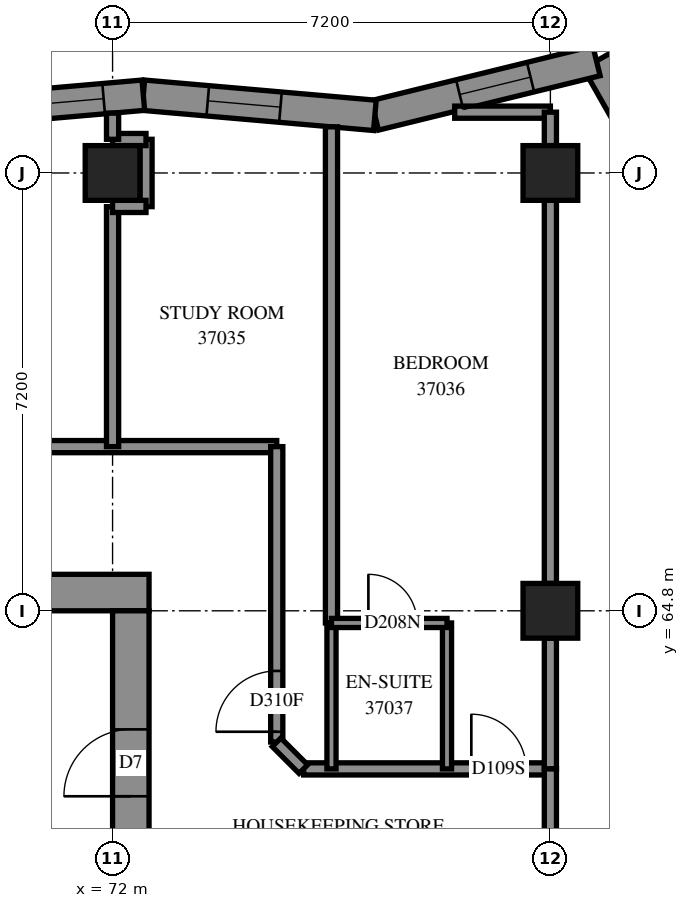
"""IFC4 building model, lengths in metres.
Left out: names, types, materials, properties, quantities, classifications, styles, units other than length and angle.
Written with IfcOpenShell. Run it as: python <this file> out.ifc"""

import sys

from ifc_helpers import new_model, si_unit, direction, frame, frame_2d, origin, origin_2d, place, context, subcontext, project, spatial, polyline, rectangle, outline, extrude, element, fill, save


model = new_model("IFC4")
c1 = context("Model", 3, precision=1e-05, world=origin(), true_north=direction((0.0, 1.0)))
c2 = subcontext(c1, "Body", "Model", "MODEL_VIEW")
j1 = project(units=[si_unit("LENGTHUNIT", "METRE"), si_unit("PLANEANGLEUNIT", "RADIAN")], contexts=[c1])
p1 = place(None, origin())
s1 = spatial("IfcSite", under=j1, at=p1, CompositionType="ELEMENT")
p2 = place(p1, origin())
s2 = spatial("IfcBuilding", under=s1, at=p2, CompositionType="ELEMENT")
p3 = place(p2, frame((0.0, 0.0, 138.8)))
s3 = spatial("IfcBuildingStorey", under=s2, at=p3, CompositionType="ELEMENT", Elevation=138.8)
for number, where, z_axis, x_axis in (
    (1, (72.0, 72.0, 0.0), (0.0, 0.0, 1.0), (1.0, 0.0, 0.0)),
    (2, (79.2, 64.8, 0.0), (0.0, 0.0, 1.0), (1.0, 0.0, 0.0)),
    (3, (79.2, 72.0, 0.0), (0.0, 0.0, 1.0), (1.0, 0.0, 0.0)),
):
    element("IfcColumn", number, at=place(p3, frame(where, z_axis=z_axis, x_axis=x_axis)), inside=s3, PredefinedType="COLUMN", context=c2, shape_type="SweptSolid", body=[
        extrude(rectangle(XDim=0.9, YDim=0.9, at=origin_2d()), origin(), (0.0, 0.0, 1.0), 3.1),
    ])
p4 = place(p3, frame((57.0, 65.1, -0.3), z_axis=(0.0, 0.0, 1.0), x_axis=(1.0, 0.0, 0.0)))
e4 = element("IfcWall", 4, at=p4, inside=s3, PredefinedType="SHEAR", context=c2, shape_type="SweptSolid", body=[
    extrude(rectangle(XDim=15.6, YDim=0.6, at=frame_2d((7.8, 0.0))), origin(), (0.0, 0.0, 1.0), 2.7),
])
p5 = place(p4, frame((10.6, 0.0, 0.3)))
e5 = element("IfcOpeningElement", 5, at=p5, cuts=e4, PredefinedType="OPENING", context=c2, shape_type="SweptSolid", body=[
    extrude(rectangle(XDim=0.8, YDim=2.1, at=frame_2d((0.4, 1.05))), frame((0.0, 0.31, 0.0), z_axis=(0.0, -1.0, 0.0), x_axis=(1.0, 0.0, 0.0)), (0.0, 0.0, 1.0), 0.62),
])
p6 = place(p3, frame((72.3, 50.4, -0.3), z_axis=(0.0, 0.0, 1.0), x_axis=(0.0, 1.0, 0.0)))
e6 = element("IfcWall", 6, at=p6, inside=s3, PredefinedType="SHEAR", context=c2, shape_type="SweptSolid", body=[
    extrude(rectangle(XDim=14.4, YDim=0.6, at=frame_2d((7.2, 0.0))), origin(), (0.0, 0.0, 1.0), 2.7),
])
p7 = place(p6, frame((4.55, 0.0, 0.3)))
e7 = element("IfcOpeningElement", 7, at=p7, cuts=e6, PredefinedType="OPENING", context=c2, shape_type="SweptSolid", body=[
    extrude(rectangle(XDim=1.1, YDim=2.1, at=frame_2d((0.55, 1.05))), frame((0.0, 0.31, 0.0), z_axis=(0.0, -1.0, 0.0), x_axis=(1.0, 0.0, 0.0)), (0.0, 0.0, 1.0), 0.62),
])
p8 = place(p6, frame((11.35, 0.0, 0.3)))
e8 = element("IfcOpeningElement", 8, at=p8, cuts=e6, PredefinedType="OPENING", context=c2, shape_type="SweptSolid", body=[
    extrude(rectangle(XDim=1.1, YDim=2.1, at=frame_2d((0.55, 1.05))), frame((0.0, 0.31, 0.0), z_axis=(0.0, -1.0, 0.0), x_axis=(1.0, 0.0, 0.0)), (0.0, 0.0, 1.0), 0.62),
])
p9 = place(p3, frame((81.616, 70.923, 0.0), z_axis=(0.0, 0.0, 1.0), x_axis=(-0.4937468039, 0.8696057116, 0.0)))
e9 = element("IfcWall", 9, at=p9, inside=s3, PredefinedType="SOLIDWALL", context=c2, shape_type="SweptSolid", body=[
    extrude(outline(polyline([(0.046, -0.25), (3.546, -0.25), (3.167, 0.25), (-0.046, 0.25), (0.046, -0.25)])), origin(), (0.0, 0.0, 1.0), 3.1),
])
p10 = place(p9, frame((0.781, 0.0, 0.45)))
e10 = element("IfcOpeningElement", 10, at=p10, cuts=e9, PredefinedType="OPENING", context=c2, shape_type="SweptSolid", body=[
    extrude(rectangle(XDim=1.2, YDim=2.5, at=frame_2d((0.6, 1.25))), frame((0.0, 0.26, 0.0), z_axis=(0.0, -1.0, 0.0), x_axis=(1.0, 0.0, 0.0)), (0.0, 0.0, 1.0), 0.52),
])
p11 = place(p3, frame((79.958, 73.842, 0.0), z_axis=(0.0, 0.0, 1.0), x_axis=(-0.9711681405, -0.2383955595, 0.0)))
e11 = element("IfcWall", 11, at=p11, inside=s3, PredefinedType="SOLIDWALL", context=c2, shape_type="SweptSolid", body=[
    extrude(outline(polyline([(-0.189, -0.25), (3.712, -0.25), (3.794, 0.25), (0.189, 0.25), (-0.189, -0.25)])), origin(), (0.0, 0.0, 1.0), 3.1),
])
p12 = place(p11, frame((1.117, 0.0, 0.45)))
e12 = element("IfcOpeningElement", 12, at=p12, cuts=e11, PredefinedType="OPENING", context=c2, shape_type="SweptSolid", body=[
    extrude(rectangle(XDim=1.2, YDim=2.5, at=frame_2d((0.6, 1.25))), frame((0.0, 0.26, 0.0), z_axis=(0.0, -1.0, 0.0), x_axis=(1.0, 0.0, 0.0)), (0.0, 0.0, 1.0), 0.52),
])
p13 = place(p3, frame((76.314, 72.947, 0.0), z_axis=(0.0, 0.0, 1.0), x_axis=(-0.9962271263, 0.0867842891, 0.0)))
e13 = element("IfcWall", 13, at=p13, inside=s3, PredefinedType="SOLIDWALL", context=c2, shape_type="SweptSolid", body=[
    extrude(outline(polyline([(0.041, -0.25), (3.844, -0.25), (3.8, 0.25), (-0.041, 0.25), (0.041, -0.25)])), origin(), (0.0, 0.0, 1.0), 3.1),
])
p14 = place(p13, frame((1.558, 0.0, 0.45)))
e14 = element("IfcOpeningElement", 14, at=p14, cuts=e13, PredefinedType="OPENING", context=c2, shape_type="SweptSolid", body=[
    extrude(rectangle(XDim=1.2, YDim=2.5, at=frame_2d((0.6, 1.25))), frame((0.0, 0.26, 0.0), z_axis=(0.0, -1.0, 0.0), x_axis=(1.0, 0.0, 0.0)), (0.0, 0.0, 1.0), 0.52),
])
p15 = place(p3, frame((72.506, 73.279, 0.0), z_axis=(0.0, 0.0, 1.0), x_axis=(-0.9962273538, -0.0867816769, 0.0)))
e15 = element("IfcWall", 15, at=p15, inside=s3, PredefinedType="SOLIDWALL", context=c2, shape_type="SweptSolid", body=[
    extrude(outline(polyline([(-0.022, -0.25), (3.781, -0.25), (3.824, 0.25), (0.022, 0.25), (-0.022, -0.25)])), origin(), (0.0, 0.0, 1.0), 3.1),
])
p16 = place(p15, frame((0.655, 0.0, 0.45)))
e16 = element("IfcOpeningElement", 16, at=p16, cuts=e15, PredefinedType="OPENING", context=c2, shape_type="SweptSolid", body=[
    extrude(rectangle(XDim=2.8, YDim=2.5, at=frame_2d((1.4, 1.25))), frame((0.0, 0.26, 0.0), z_axis=(0.0, -1.0, 0.0), x_axis=(1.0, 0.0, 0.0)), (0.0, 0.0, 1.0), 0.52),
])
p17 = place(p3, frame((54.9, 67.5, 0.0), z_axis=(0.0, 0.0, 1.0), x_axis=(1.0, 0.0, 0.0)))
e17 = element("IfcWall", 17, at=p17, inside=s3, PredefinedType="PARTITIONING", context=c2, shape_type="SweptSolid", body=[
    extrude(rectangle(XDim=19.8, YDim=0.2, at=frame_2d((9.9, 0.0))), origin(), (0.0, 0.0, 1.0), 3.1),
])
p18 = place(p17, frame((6.586, 0.0, 0.0)))
e18 = element("IfcOpeningElement", 18, at=p18, cuts=e17, PredefinedType="OPENING", context=c2, shape_type="SweptSolid", body=[
    extrude(rectangle(XDim=1.0, YDim=2.1, at=frame_2d((0.5, 1.05))), frame((0.0, 0.11, 0.0), z_axis=(0.0, -1.0, 0.0), x_axis=(1.0, 0.0, 0.0)), (0.0, 0.0, 1.0), 0.22),
])
p19 = place(p17, frame((14.089, 0.0, 0.0)))
e19 = element("IfcOpeningElement", 19, at=p19, cuts=e17, PredefinedType="OPENING", context=c2, shape_type="SweptSolid", body=[
    extrude(rectangle(XDim=1.0, YDim=2.1, at=frame_2d((0.5, 1.05))), frame((0.0, 0.11, 0.0), z_axis=(0.0, -1.0, 0.0), x_axis=(1.0, 0.0, 0.0)), (0.0, 0.0, 1.0), 0.22),
])
p20 = place(p3, frame((75.6, 64.6, 0.0), z_axis=(0.0, 0.0, 1.0), x_axis=(0.0, 1.0, 0.0)))
e20 = element("IfcWall", 20, at=p20, inside=s3, PredefinedType="PARTITIONING", context=c2, shape_type="SweptSolid", body=[
    extrude(rectangle(XDim=8.159, YDim=0.2, at=frame_2d((4.079, 0.0))), origin(), (0.0, 0.0, 1.0), 3.1),
])
p21 = place(p3, frame((79.2, 65.25, 0.0), z_axis=(0.0, 0.0, 1.0), x_axis=(0.0, 1.0, 0.0)))
e21 = element("IfcWall", 21, at=p21, inside=s3, PredefinedType="PARTITIONING", context=c2, shape_type="SweptSolid", body=[
    extrude(rectangle(XDim=6.3, YDim=0.2, at=frame_2d((3.15, 0.0))), origin(), (0.0, 0.0, 1.0), 3.1),
])
p22 = place(p3, frame((74.7, 62.642, 0.0), z_axis=(0.0, 0.0, 1.0), x_axis=(0.0, 1.0, 0.0)))
e22 = element("IfcWall", 22, at=p22, inside=s3, PredefinedType="PARTITIONING", context=c2, shape_type="SweptSolid", body=[
    extrude(rectangle(XDim=4.858, YDim=0.2, at=frame_2d((2.429, 0.0))), origin(), (0.0, 0.0, 1.0), 3.1),
])
p23 = place(p22, frame((0.169, 0.0, 0.0)))
e23 = element("IfcOpeningElement", 23, at=p23, cuts=e22, PredefinedType="OPENING", context=c2, shape_type="SweptSolid", body=[
    extrude(rectangle(XDim=1.0, YDim=2.1, at=frame_2d((0.5, 1.05))), frame((0.0, 0.11, 0.0), z_axis=(0.0, -1.0, 0.0), x_axis=(1.0, 0.0, 0.0)), (0.0, 0.0, 1.0), 0.22),
])
p24 = place(p3, frame((75.142, 62.2, 0.0), z_axis=(0.0, 0.0, 1.0), x_axis=(1.0, 0.0, 0.0)))
e24 = element("IfcWall", 24, at=p24, inside=s3, PredefinedType="PARTITIONING", context=c2, shape_type="SweptSolid", body=[
    extrude(rectangle(XDim=4.058, YDim=0.2, at=frame_2d((2.029, 0.0))), origin(), (0.0, 0.0, 1.0), 3.1),
])
p25 = place(p24, frame((2.758, 0.0, 0.0)))
e25 = element("IfcOpeningElement", 25, at=p25, cuts=e24, PredefinedType="OPENING", context=c2, shape_type="SweptSolid", body=[
    extrude(rectangle(XDim=0.9, YDim=2.1, at=frame_2d((0.45, 1.05))), frame((0.0, 0.11, 0.0), z_axis=(0.0, -1.0, 0.0), x_axis=(1.0, 0.0, 0.0)), (0.0, 0.0, 1.0), 0.22),
])
p26 = place(p3, frame((72.0, 67.5, 0.0), z_axis=(0.0, 0.0, 1.0), x_axis=(0.0, 1.0, 0.0)))
e26 = element("IfcWall", 26, at=p26, inside=s3, PredefinedType="PARTITIONING", context=c2, shape_type="SweptSolid", body=[
    extrude(rectangle(XDim=3.946, YDim=0.2, at=frame_2d((1.973, 0.0))), origin(), (0.0, 0.0, 1.0), 3.1),
])
for number, where, z_axis, x_axis in (
    (27, (75.6, 62.2, 0.0), (0.0, 0.0, 1.0), (0.0, 1.0, 0.0)),
    (28, (77.5, 62.2, 0.0), (0.0, 0.0, 1.0), (0.0, 1.0, 0.0)),
):
    element("IfcWall", number, at=place(p3, frame(where, z_axis=z_axis, x_axis=x_axis)), inside=s3, PredefinedType="PARTITIONING", context=c2, shape_type="SweptSolid", body=[
        extrude(rectangle(XDim=2.4, YDim=0.15, at=frame_2d((1.2, 0.0))), origin(), (0.0, 0.0, 1.0), 3.1),
    ])
p27 = place(p3, frame((79.2, 62.2, 0.0), z_axis=(0.0, 0.0, 1.0), x_axis=(0.0, 1.0, 0.0)))
e29 = element("IfcWall", 29, at=p27, inside=s3, PredefinedType="PARTITIONING", context=c2, shape_type="SweptSolid", body=[
    extrude(rectangle(XDim=2.15, YDim=0.2, at=frame_2d((1.075, 0.0))), origin(), (0.0, 0.0, 1.0), 3.1),
])
p28 = place(p3, frame((79.2, 60.2, 0.0), z_axis=(0.0, 0.0, 1.0), x_axis=(0.0, 1.0, 0.0)))
e30 = element("IfcWall", 30, at=p28, inside=s3, PredefinedType="PARTITIONING", context=c2, shape_type="SweptSolid", body=[
    extrude(rectangle(XDim=2.0, YDim=0.2, at=frame_2d((1.0, 0.0))), origin(), (0.0, 0.0, 1.0), 3.1),
])
p29 = place(p3, frame((75.6, 64.6, 0.0), z_axis=(0.0, 0.0, 1.0), x_axis=(1.0, 0.0, 0.0)))
e31 = element("IfcWall", 31, at=p29, inside=s3, PredefinedType="PARTITIONING", context=c2, shape_type="SweptSolid", body=[
    extrude(rectangle(XDim=1.9, YDim=0.15, at=frame_2d((0.95, 0.0))), origin(), (0.0, 0.0, 1.0), 3.1),
])
p30 = place(p29, frame((0.607, 0.0, 0.0)))
e32 = element("IfcOpeningElement", 32, at=p30, cuts=e31, PredefinedType="OPENING", context=c2, shape_type="SweptSolid", body=[
    extrude(rectangle(XDim=0.8, YDim=2.1, at=frame_2d((0.4, 1.05))), frame((0.0, 0.085, 0.0), z_axis=(0.0, -1.0, 0.0), x_axis=(1.0, 0.0, 0.0)), (0.0, 0.0, 1.0), 0.17),
])
p31 = place(p3, frame((77.626, 73.0, 0.0), z_axis=(0.0, 0.0, 1.0), x_axis=(1.0, 0.0, 0.0)))
e33 = element("IfcWall", 33, at=p31, inside=s3, PredefinedType="PARTITIONING", context=c2, shape_type="SweptSolid", body=[
    extrude(rectangle(XDim=1.573, YDim=0.2, at=frame_2d((0.787, 0.0))), origin(), (0.0, 0.0, 1.0), 3.1),
])
p32 = place(p3, frame((72.55, 71.446, 0.0), z_axis=(0.0, 0.0, 1.0), x_axis=(0.0, 1.0, 0.0)))
e34 = element("IfcWall", 34, at=p32, inside=s3, PredefinedType="PARTITIONING", context=c2, shape_type="SweptSolid", body=[
    extrude(rectangle(XDim=1.108, YDim=0.2, at=frame_2d((0.554, 0.0))), origin(), (0.0, 0.0, 1.0), 3.1),
])
p33 = place(p3, frame((74.697, 62.637, 0.0), z_axis=(0.0, 0.0, 1.0), x_axis=(0.7071067812, -0.7071067812, 0.0)))
e35 = element("IfcWall", 35, at=p33, inside=s3, PredefinedType="PARTITIONING", context=c2, shape_type="SweptSolid", body=[
    extrude(rectangle(XDim=0.622, YDim=0.2, at=frame_2d((0.311, 0.0))), origin(), (0.0, 0.0, 1.0), 3.1),
])
for number, where, z_axis, x_axis in (
    (36, (72.0, 71.45, 0.0), (0.0, 0.0, 1.0), (1.0, 0.0, 0.0)),
    (37, (72.0, 72.55, 0.0), (0.0, 0.0, 1.0), (1.0, 0.0, 0.0)),
    (38, (79.2, 72.45, 0.0), (0.0, 0.0, 1.0), (0.0, 1.0, 0.0)),
):
    element("IfcWall", number, at=place(p3, frame(where, z_axis=z_axis, x_axis=x_axis)), inside=s3, PredefinedType="PARTITIONING", context=c2, shape_type="SweptSolid", body=[
        extrude(rectangle(XDim=0.55, YDim=0.2, at=frame_2d((0.275, 0.0))), origin(), (0.0, 0.0, 1.0), 3.1),
    ])
p34 = place(p3, frame((72.0, 72.554, 0.0), z_axis=(0.0, 0.0, 1.0), x_axis=(0.0, 1.0, 0.0)))
e39 = element("IfcWall", 39, at=p34, inside=s3, PredefinedType="PARTITIONING", context=c2, shape_type="SweptSolid", body=[
    extrude(rectangle(XDim=0.43, YDim=0.2, at=frame_2d((0.215, 0.0))), origin(), (0.0, 0.0, 1.0), 3.1),
])
p35 = place(p12, origin())
e40 = element("IfcWindow", 40, at=p35, inside=s3, PartitioningType="SINGLE_PANEL", PredefinedType="WINDOW", context=c2, shape_type="SweptSolid", body=[
    extrude(rectangle(XDim=1.2, YDim=2.5, at=frame_2d((0.6, 1.25))), frame((0.0, 0.16, 0.0), z_axis=(0.0, -1.0, 0.0), x_axis=(1.0, 0.0, 0.0)), (0.0, 0.0, 1.0), 0.06),
])
fill(e12, e40)
p36 = place(p14, origin())
e41 = element("IfcWindow", 41, at=p36, inside=s3, PartitioningType="SINGLE_PANEL", PredefinedType="WINDOW", context=c2, shape_type="SweptSolid", body=[
    extrude(rectangle(XDim=1.2, YDim=2.5, at=frame_2d((0.6, 1.25))), frame((0.0, 0.18, 0.0), z_axis=(0.0, -1.0, 0.0), x_axis=(1.0, 0.0, 0.0)), (0.0, 0.0, 1.0), 0.06),
])
fill(e14, e41)
p37 = place(p16, origin())
e42 = element("IfcWindow", 42, at=p37, inside=s3, PartitioningType="SINGLE_PANEL", PredefinedType="WINDOW", context=c2, shape_type="SweptSolid", body=[
    extrude(rectangle(XDim=2.8, YDim=2.5, at=frame_2d((1.4, 1.25))), frame((0.0, 0.18, 0.0), z_axis=(0.0, -1.0, 0.0), x_axis=(1.0, 0.0, 0.0)), (0.0, 0.0, 1.0), 0.06),
])
fill(e16, e42)
p38 = place(p8, origin())
e43 = element("IfcDoor", 43, at=p38, inside=s3, OperationType="SINGLE_SWING_RIGHT", PredefinedType="DOOR", context=c2, shape_type="SweptSolid", body=[
    extrude(rectangle(XDim=1.1, YDim=2.1, at=frame_2d((0.55, 1.05))), frame((0.0, 0.025, 0.0), z_axis=(0.0, -1.0, 0.0), x_axis=(1.0, 0.0, 0.0)), (0.0, 0.0, 1.0), 0.05),
])
fill(e8, e43)
p39 = place(p23, origin())
e44 = element("IfcDoor", 44, at=p39, inside=s3, OperationType="SINGLE_SWING_RIGHT", PredefinedType="DOOR", context=c2, shape_type="SweptSolid", body=[
    extrude(rectangle(XDim=1.0, YDim=2.1, at=frame_2d((0.5, 1.05))), frame((0.0, 0.025, 0.0), z_axis=(0.0, -1.0, 0.0), x_axis=(1.0, 0.0, 0.0)), (0.0, 0.0, 1.0), 0.05),
])
fill(e23, e44)
p40 = place(p25, origin())
e45 = element("IfcDoor", 45, at=p40, inside=s3, OperationType="SINGLE_SWING_LEFT", PredefinedType="DOOR", context=c2, shape_type="SweptSolid", body=[
    extrude(rectangle(XDim=0.9, YDim=2.1, at=frame_2d((0.45, 1.05))), frame((0.0, 0.025, 0.0), z_axis=(0.0, -1.0, 0.0), x_axis=(1.0, 0.0, 0.0)), (0.0, 0.0, 1.0), 0.05),
])
fill(e25, e45)
p41 = place(p30, origin())
e46 = element("IfcDoor", 46, at=p41, inside=s3, OperationType="SINGLE_SWING_RIGHT", PredefinedType="DOOR", context=c2, shape_type="SweptSolid", body=[
    extrude(rectangle(XDim=0.8, YDim=2.1, at=frame_2d((0.4, 1.05))), frame((0.0, 0.025, 0.0), z_axis=(0.0, -1.0, 0.0), x_axis=(1.0, 0.0, 0.0)), (0.0, 0.0, 1.0), 0.05),
])
fill(e32, e46)
save(model, sys.argv[1])
